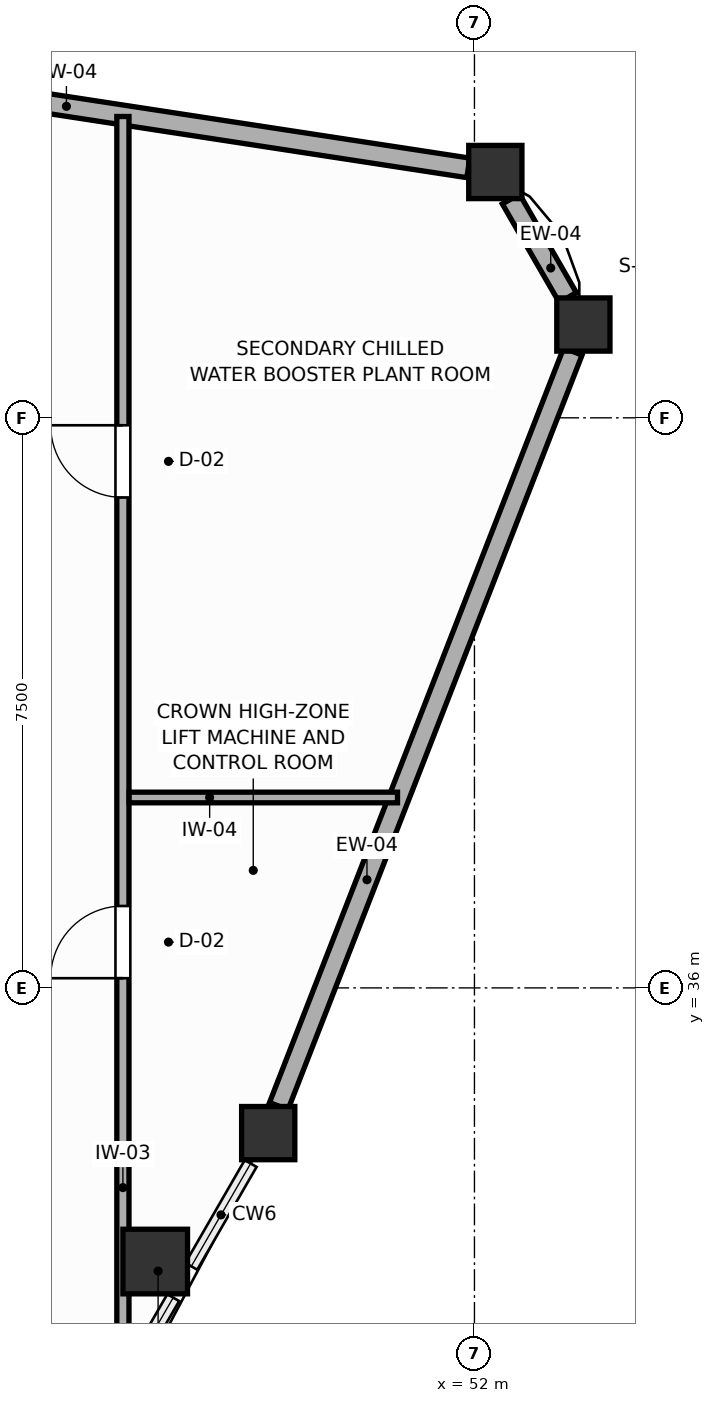
"""IFC4 building model, lengths in metres.
Left out: names, types, materials, properties, quantities, classifications, styles, units other than length and angle.
Written with IfcOpenShell. Run it as: python <this file> out.ifc"""

import sys

from ifc_helpers import new_model, si_unit, direction, frame, frame_2d, origin, origin_2d, place, context, subcontext, project, spatial, rectangle, extrude, source, transform, mapped, element, fill, save


model = new_model("IFC4")
c1 = context("Model", 3, precision=1e-05, world=origin(), true_north=direction((0.0, 1.0)))
c2 = subcontext(c1, "Body", "Model", "MODEL_VIEW")
j1 = project(units=[si_unit("LENGTHUNIT", "METRE"), si_unit("PLANEANGLEUNIT", "RADIAN")], contexts=[c1])
p1 = place(None, origin())
s1 = spatial("IfcSite", under=j1, at=p1, CompositionType="ELEMENT")
p2 = place(p1, origin())
s2 = spatial("IfcBuilding", under=s1, at=p2, CompositionType="ELEMENT")
p3 = place(p2, frame((0.0, 0.0, 292.2)))
s3 = spatial("IfcBuildingStorey", under=s2, at=p3, CompositionType="ELEMENT", Elevation=292.2)
m1 = source(origin(), c2, "Body", "SweptSolid", [
    extrude(rectangle(XDim=0.85, YDim=0.85, at=origin_2d()), origin(), (0.0, 0.0, 1.0), 3.9),
])
p4 = place(p3, frame((47.8, 32.4, 0.0), z_axis=(0.0, 0.0, 1.0), x_axis=(1.0, 0.0, 0.0)))
e1 = element("IfcColumn", 1, at=p4, inside=s3, PredefinedType="COLUMN", context=c2, shape_type="MappedRepresentation", body=[
    mapped(m1, transform((0.0, 0.0, 0.0), scale=1.0)),
])
m2 = source(origin(), c2, "Body", "SweptSolid", [
    extrude(rectangle(XDim=0.7, YDim=0.7, at=origin_2d()), origin(), (0.0, 0.0, 1.0), 3.9),
])
for number, where, z_axis, x_axis in (
    (2, (53.433, 44.727, 0.0), (0.0, 0.0, 1.0), (1.0, 0.0, 0.0)),
    (3, (52.275, 46.734, 0.0), (0.0, 0.0, 1.0), (1.0, 0.0, 0.0)),
    (4, (49.287, 34.09, 0.0), (0.0, 0.0, 1.0), (1.0, 0.0, 0.0)),
):
    element("IfcColumn", number, at=place(p3, frame(where, z_axis=z_axis, x_axis=x_axis)), inside=s3, PredefinedType="COLUMN", context=c2, shape_type="MappedRepresentation", body=[
        mapped(m2, transform((0.0, 0.0, 0.0), scale=1.0)),
    ])
p5 = place(p3, frame((53.228, 45.083, 0.0), z_axis=(0.0, 0.0, 1.0), x_axis=(-0.499910707084, 0.866076950936, 0.0)))
e5 = element("IfcWall", 5, at=p5, inside=s3, PredefinedType="SOLIDWALL", context=c2, shape_type="SweptSolid", body=[
    extrude(rectangle(XDim=1.497, YDim=0.26, at=frame_2d((0.749, 0.0))), origin(), (0.0, 0.0, 1.0), 2.05),
])
p6 = place(p3, frame((51.92, 46.788, 0.0), z_axis=(0.0, 0.0, 1.0), x_axis=(-0.988478819852, 0.151359250475, 0.0)))
e6 = element("IfcWall", 6, at=p6, inside=s3, PredefinedType="SOLIDWALL", context=c2, shape_type="SweptSolid", body=[
    extrude(rectangle(XDim=10.699, YDim=0.26, at=frame_2d((5.35, 0.0))), origin(), (0.0, 0.0, 1.0), 2.05),
])
p7 = place(p3, frame((49.425, 34.445, 0.0), z_axis=(0.0, 0.0, 1.0), x_axis=(0.363147184015, 0.931731786912, 0.0)))
e7 = element("IfcWall", 7, at=p7, inside=s3, PredefinedType="SOLIDWALL", context=c2, shape_type="SweptSolid", body=[
    extrude(rectangle(XDim=10.655, YDim=0.26, at=frame_2d((5.328, 0.0))), origin(), (0.0, 0.0, 1.0), 2.05),
])
p8 = place(p3, frame((47.375, 30.798, 0.0), z_axis=(0.0, 0.0, 1.0), x_axis=(0.0, 1.0, 0.0)))
e8 = element("IfcWall", 8, at=p8, inside=s3, PredefinedType="PARTITIONING", context=c2, shape_type="SweptSolid", body=[
    extrude(rectangle(XDim=16.666, YDim=0.16, at=frame_2d((8.333, 0.0))), origin(), (0.0, 0.0, 1.0), 3.65),
])
p9 = place(p8, frame((5.329, 0.0, 0.0)))
e9 = element("IfcOpeningElement", 9, at=p9, cuts=e8, PredefinedType="OPENING", context=c2, shape_type="SweptSolid", body=[
    extrude(rectangle(XDim=0.95, YDim=2.05, at=frame_2d((0.475, 1.025))), frame((0.0, 0.09, 0.0), z_axis=(0.0, -1.0, 0.0), x_axis=(1.0, 0.0, 0.0)), (0.0, 0.0, 1.0), 0.18),
])
p10 = place(p8, frame((11.654, 0.0, 0.0)))
e10 = element("IfcOpeningElement", 10, at=p10, cuts=e8, PredefinedType="OPENING", context=c2, shape_type="SweptSolid", body=[
    extrude(rectangle(XDim=0.95, YDim=2.05, at=frame_2d((0.475, 1.025))), frame((0.0, 0.09, 0.0), z_axis=(0.0, -1.0, 0.0), x_axis=(1.0, 0.0, 0.0)), (0.0, 0.0, 1.0), 0.18),
])
p11 = place(p3, frame((47.457, 32.275, 0.0), z_axis=(0.0, 0.0, 1.0), x_axis=(1.0, 0.0, 0.0)))
e11 = element("IfcWall", 11, at=p11, inside=s3, PredefinedType="PARTITIONING", context=c2, shape_type="SweptSolid", body=[
    extrude(rectangle(XDim=0.762, YDim=0.16, at=frame_2d((0.381, 0.0))), origin(), (0.0, 0.0, 1.0), 3.65),
])
p12 = place(p3, frame((47.457, 38.505, 0.0), z_axis=(0.0, 0.0, 1.0), x_axis=(1.0, 0.0, 0.0)))
e12 = element("IfcWall", 12, at=p12, inside=s3, PredefinedType="PARTITIONING", context=c2, shape_type="SweptSolid", body=[
    extrude(rectangle(XDim=3.531, YDim=0.14, at=frame_2d((1.765, 0.0))), origin(), (0.0, 0.0, 1.0), 3.65),
])
p13 = place(p9, origin())
e13 = element("IfcDoor", 13, at=p13, inside=s3, OperationType="SINGLE_SWING_LEFT", PredefinedType="DOOR", context=c2, shape_type="SweptSolid", body=[
    extrude(rectangle(XDim=0.95, YDim=2.05, at=frame_2d((0.475, 1.025))), frame((0.0, 0.025, 0.0), z_axis=(0.0, -1.0, 0.0), x_axis=(1.0, 0.0, 0.0)), (0.0, 0.0, 1.0), 0.05),
])
fill(e9, e13)
p14 = place(p10, origin())
e14 = element("IfcDoor", 14, at=p14, inside=s3, OperationType="SINGLE_SWING_RIGHT", PredefinedType="DOOR", context=c2, shape_type="SweptSolid", body=[
    extrude(rectangle(XDim=0.95, YDim=2.05, at=frame_2d((0.475, 1.025))), frame((0.0, 0.025, 0.0), z_axis=(0.0, -1.0, 0.0), x_axis=(1.0, 0.0, 0.0)), (0.0, 0.0, 1.0), 0.05),
])
fill(e10, e14)
save(model, sys.argv[1])
